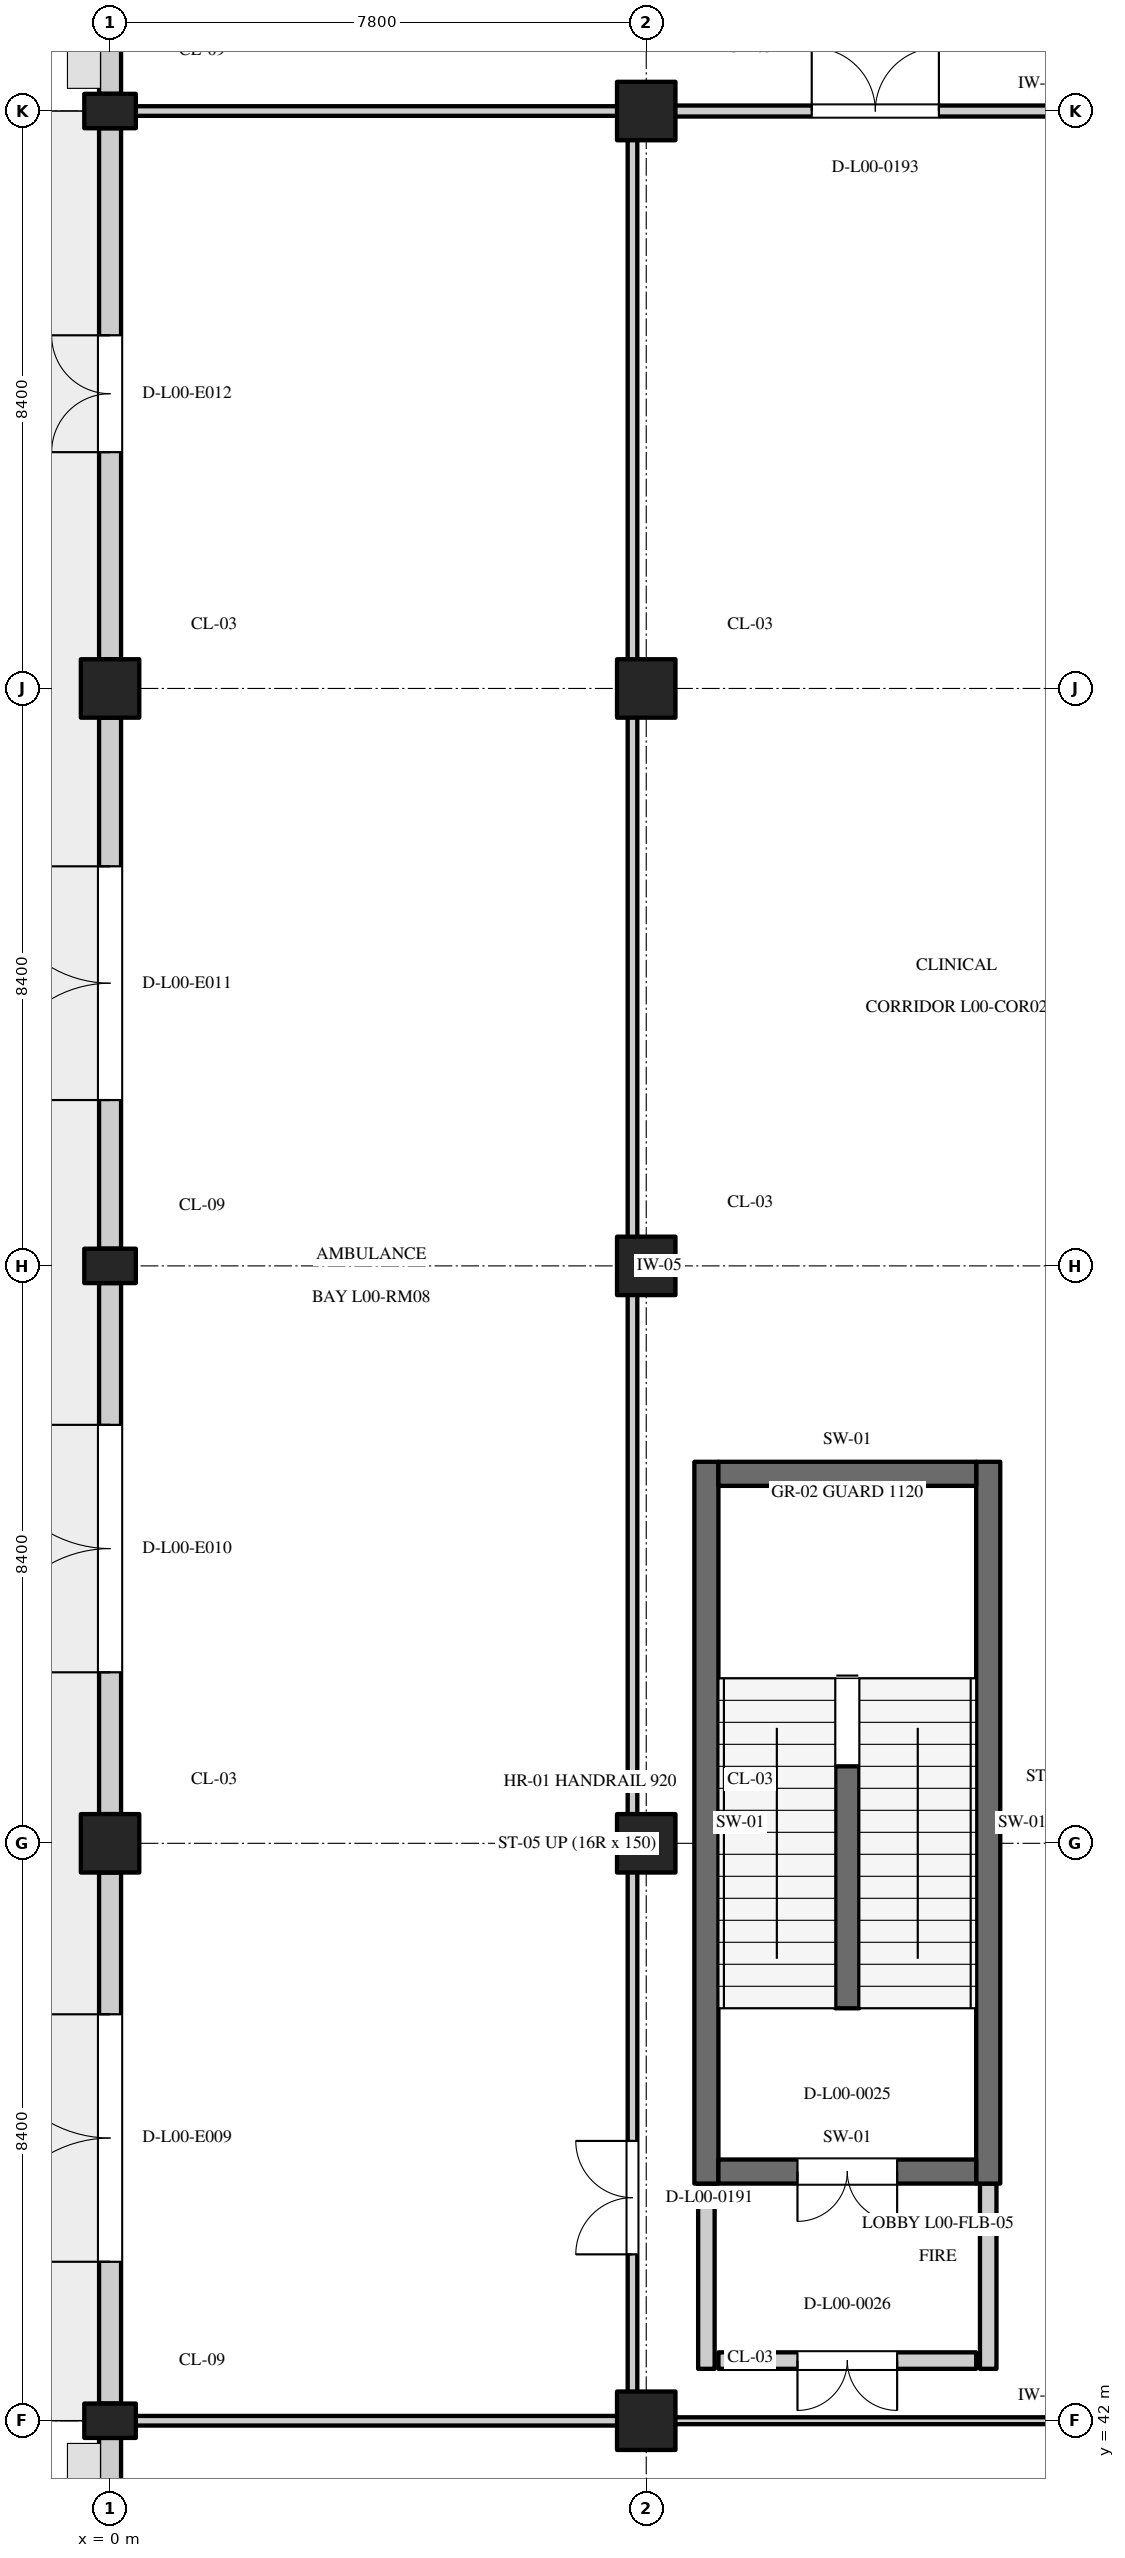
"""IFC4 building model, lengths in metres.
Left out: names, types, materials, properties, quantities, classifications, styles, units other than length and angle.
Written with IfcOpenShell. Run it as: python <this file> out.ifc"""

import sys

from ifc_helpers import new_model, si_unit, direction, frame, frame_2d, origin, origin_2d, place, context, subcontext, project, spatial, rectangle, extrude, element, fill, save


model = new_model("IFC4")
c1 = context("Model", 3, precision=1e-05, world=origin(), true_north=direction((0.0, 1.0)))
c2 = subcontext(c1, "Body", "Model", "MODEL_VIEW")
j1 = project(units=[si_unit("LENGTHUNIT", "METRE"), si_unit("PLANEANGLEUNIT", "RADIAN")], contexts=[c1])
p1 = place(None, origin())
s1 = spatial("IfcSite", under=j1, at=p1, CompositionType="ELEMENT")
p2 = place(p1, origin())
s2 = spatial("IfcBuilding", under=s1, at=p2, CompositionType="ELEMENT")
p3 = place(p2, origin())
s3 = spatial("IfcBuildingStorey", under=s2, at=p3, CompositionType="ELEMENT", Elevation=0.0)
p4 = place(p3, frame((0.0, 42.0, 0.0), z_axis=(0.0, 0.0, 1.0), x_axis=(0.0, 1.0, 0.0)))
e1 = element("IfcColumn", 1, at=p4, inside=s3, PredefinedType="PILASTER", context=c2, shape_type="SweptSolid", body=[
    extrude(rectangle(XDim=0.5, YDim=0.75, at=origin_2d()), origin(), (0.0, 0.0, 1.0), 4.8),
])
p5 = place(p3, frame((0.0, 50.4, 0.0), z_axis=(0.0, 0.0, 1.0), x_axis=(1.0, 0.0, 0.0)))
e2 = element("IfcColumn", 2, at=p5, inside=s3, PredefinedType="COLUMN", context=c2, shape_type="SweptSolid", body=[
    extrude(rectangle(XDim=0.85, YDim=0.85, at=origin_2d()), origin(), (0.0, 0.0, 1.0), 4.8),
])
p6 = place(p3, frame((0.0, 58.8, 0.0), z_axis=(0.0, 0.0, 1.0), x_axis=(0.0, 1.0, 0.0)))
e3 = element("IfcColumn", 3, at=p6, inside=s3, PredefinedType="PILASTER", context=c2, shape_type="SweptSolid", body=[
    extrude(rectangle(XDim=0.5, YDim=0.75, at=origin_2d()), origin(), (0.0, 0.0, 1.0), 4.8),
])
p7 = place(p3, frame((0.0, 67.2, 0.0), z_axis=(0.0, 0.0, 1.0), x_axis=(1.0, 0.0, 0.0)))
e4 = element("IfcColumn", 4, at=p7, inside=s3, PredefinedType="COLUMN", context=c2, shape_type="SweptSolid", body=[
    extrude(rectangle(XDim=0.85, YDim=0.85, at=origin_2d()), origin(), (0.0, 0.0, 1.0), 4.8),
])
p8 = place(p3, frame((0.0, 75.6, 0.0), z_axis=(0.0, 0.0, 1.0), x_axis=(0.0, 1.0, 0.0)))
e5 = element("IfcColumn", 5, at=p8, inside=s3, PredefinedType="PILASTER", context=c2, shape_type="SweptSolid", body=[
    extrude(rectangle(XDim=0.5, YDim=0.75, at=origin_2d()), origin(), (0.0, 0.0, 1.0), 4.8),
])
for number, where, z_axis, x_axis in (
    (6, (7.8, 42.0, 0.0), (0.0, 0.0, 1.0), (1.0, 0.0, 0.0)),
    (7, (7.8, 50.4, 0.0), (0.0, 0.0, 1.0), (1.0, 0.0, 0.0)),
    (8, (7.8, 58.8, 0.0), (0.0, 0.0, 1.0), (1.0, 0.0, 0.0)),
    (9, (7.8, 67.2, 0.0), (0.0, 0.0, 1.0), (1.0, 0.0, 0.0)),
    (10, (7.8, 75.6, 0.0), (0.0, 0.0, 1.0), (1.0, 0.0, 0.0)),
):
    element("IfcColumn", number, at=place(p3, frame(where, z_axis=z_axis, x_axis=x_axis)), inside=s3, PredefinedType="COLUMN", context=c2, shape_type="SweptSolid", body=[
        extrude(rectangle(XDim=0.85, YDim=0.85, at=origin_2d()), origin(), (0.0, 0.0, 1.0), 4.8),
    ])
p9 = place(p3, frame((0.0, 34.025, 0.0), z_axis=(0.0, 0.0, 1.0), x_axis=(0.0, 1.0, 0.0)))
e11 = element("IfcWall", 11, at=p9, inside=s3, PredefinedType="STANDARD", context=c2, shape_type="SweptSolid", body=[
    extrude(rectangle(XDim=7.725, YDim=0.32, at=frame_2d((3.863, 0.0))), origin(), (0.0, 0.0, 1.0), 3.75),
])
p10 = place(p9, frame((0.709, 0.0, 0.75)))
e12 = element("IfcOpeningElement", 12, at=p10, cuts=e11, PredefinedType="OPENING", context=c2, shape_type="SweptSolid", body=[
    extrude(rectangle(XDim=2.1, YDim=1.55, at=frame_2d((1.05, 0.775))), frame((0.0, 0.172, 0.0), z_axis=(0.0, -1.0, 0.0), x_axis=(1.0, 0.0, 0.0)), (0.0, 0.0, 1.0), 0.344),
])
p11 = place(p9, frame((4.741, 0.0, 0.75)))
e13 = element("IfcOpeningElement", 13, at=p11, cuts=e11, PredefinedType="OPENING", context=c2, shape_type="SweptSolid", body=[
    extrude(rectangle(XDim=2.1, YDim=1.55, at=frame_2d((1.05, 0.775))), frame((0.0, 0.172, 0.0), z_axis=(0.0, -1.0, 0.0), x_axis=(1.0, 0.0, 0.0)), (0.0, 0.0, 1.0), 0.344),
])
p12 = place(p3, frame((0.0, 42.25, 0.0), z_axis=(0.0, 0.0, 1.0), x_axis=(0.0, 1.0, 0.0)))
e14 = element("IfcWall", 14, at=p12, inside=s3, PredefinedType="STANDARD", context=c2, shape_type="SweptSolid", body=[
    extrude(rectangle(XDim=7.725, YDim=0.32, at=frame_2d((3.863, 0.0))), origin(), (0.0, 0.0, 1.0), 3.75),
])
p13 = place(p12, frame((2.062, 0.0, 0.0)))
e15 = element("IfcOpeningElement", 15, at=p13, cuts=e14, PredefinedType="OPENING", context=c2, shape_type="SweptSolid", body=[
    extrude(rectangle(XDim=3.6, YDim=3.4, at=frame_2d((1.8, 1.7))), frame((0.0, 0.172, 0.0), z_axis=(0.0, -1.0, 0.0), x_axis=(1.0, 0.0, 0.0)), (0.0, 0.0, 1.0), 0.344),
])
p14 = place(p3, frame((0.0, 50.825, 0.0), z_axis=(0.0, 0.0, 1.0), x_axis=(0.0, 1.0, 0.0)))
e16 = element("IfcWall", 16, at=p14, inside=s3, PredefinedType="STANDARD", context=c2, shape_type="SweptSolid", body=[
    extrude(rectangle(XDim=7.725, YDim=0.32, at=frame_2d((3.863, 0.0))), origin(), (0.0, 0.0, 1.0), 3.75),
])
p15 = place(p14, frame((2.062, 0.0, 0.0)))
e17 = element("IfcOpeningElement", 17, at=p15, cuts=e16, PredefinedType="OPENING", context=c2, shape_type="SweptSolid", body=[
    extrude(rectangle(XDim=3.6, YDim=3.4, at=frame_2d((1.8, 1.7))), frame((0.0, 0.172, 0.0), z_axis=(0.0, -1.0, 0.0), x_axis=(1.0, 0.0, 0.0)), (0.0, 0.0, 1.0), 0.344),
])
p16 = place(p3, frame((0.0, 59.05, 0.0), z_axis=(0.0, 0.0, 1.0), x_axis=(0.0, 1.0, 0.0)))
e18 = element("IfcWall", 18, at=p16, inside=s3, PredefinedType="STANDARD", context=c2, shape_type="SweptSolid", body=[
    extrude(rectangle(XDim=7.725, YDim=0.32, at=frame_2d((3.862, 0.0))), origin(), (0.0, 0.0, 1.0), 3.75),
])
p17 = place(p16, frame((2.163, 0.0, 0.0)))
e19 = element("IfcOpeningElement", 19, at=p17, cuts=e18, PredefinedType="OPENING", context=c2, shape_type="SweptSolid", body=[
    extrude(rectangle(XDim=3.4, YDim=3.3, at=frame_2d((1.7, 1.65))), frame((0.0, 0.172, 0.0), z_axis=(0.0, -1.0, 0.0), x_axis=(1.0, 0.0, 0.0)), (0.0, 0.0, 1.0), 0.344),
])
p18 = place(p3, frame((0.0, 67.625, 0.0), z_axis=(0.0, 0.0, 1.0), x_axis=(0.0, 1.0, 0.0)))
e20 = element("IfcWall", 20, at=p18, inside=s3, PredefinedType="STANDARD", context=c2, shape_type="SweptSolid", body=[
    extrude(rectangle(XDim=7.725, YDim=0.32, at=frame_2d((3.863, 0.0))), origin(), (0.0, 0.0, 1.0), 3.75),
])
p19 = place(p18, frame((3.012, 0.0, 0.0)))
e21 = element("IfcOpeningElement", 21, at=p19, cuts=e20, PredefinedType="OPENING", context=c2, shape_type="SweptSolid", body=[
    extrude(rectangle(XDim=1.7, YDim=2.2, at=frame_2d((0.85, 1.1))), frame((0.0, 0.172, 0.0), z_axis=(0.0, -1.0, 0.0), x_axis=(1.0, 0.0, 0.0)), (0.0, 0.0, 1.0), 0.344),
])
p20 = place(p3, frame((0.0, 75.85, 0.0), z_axis=(0.0, 0.0, 1.0), x_axis=(0.0, 1.0, 0.0)))
e22 = element("IfcWall", 22, at=p20, inside=s3, PredefinedType="STANDARD", context=c2, shape_type="SweptSolid", body=[
    extrude(rectangle(XDim=7.725, YDim=0.32, at=frame_2d((3.862, 0.0))), origin(), (0.0, 0.0, 1.0), 3.75),
])
p21 = place(p20, frame((0.934, 0.0, 0.75)))
e23 = element("IfcOpeningElement", 23, at=p21, cuts=e22, PredefinedType="OPENING", context=c2, shape_type="SweptSolid", body=[
    extrude(rectangle(XDim=2.0, YDim=1.45, at=frame_2d((1.0, 0.725))), frame((0.0, 0.172, 0.0), z_axis=(0.0, -1.0, 0.0), x_axis=(1.0, 0.0, 0.0)), (0.0, 0.0, 1.0), 0.344),
])
p22 = place(p20, frame((4.966, 0.0, 0.75)))
e24 = element("IfcOpeningElement", 24, at=p22, cuts=e22, PredefinedType="OPENING", context=c2, shape_type="SweptSolid", body=[
    extrude(rectangle(XDim=2.0, YDim=1.45, at=frame_2d((1.0, 0.725))), frame((0.0, 0.172, 0.0), z_axis=(0.0, -1.0, 0.0), x_axis=(1.0, 0.0, 0.0)), (0.0, 0.0, 1.0), 0.344),
])
for number, where, z_axis, x_axis in (
    (25, (8.675, 45.45, 0.0), (0.0, 0.0, 1.0), (0.0, 1.0, 0.0)),
    (26, (12.775, 45.45, 0.0), (0.0, 0.0, 1.0), (0.0, 1.0, 0.0)),
):
    element("IfcWall", number, at=place(p3, frame(where, z_axis=z_axis, x_axis=x_axis)), inside=s3, PredefinedType="SHEAR", context=c2, shape_type="SweptSolid", body=[
        extrude(rectangle(XDim=10.5, YDim=0.35, at=frame_2d((5.25, 0.0))), origin(), (0.0, 0.0, 1.0), 4.8),
    ])
p23 = place(p3, frame((8.85, 55.775, 0.0), z_axis=(0.0, 0.0, 1.0), x_axis=(1.0, 0.0, 0.0)))
e27 = element("IfcWall", 27, at=p23, inside=s3, PredefinedType="SHEAR", context=c2, shape_type="SweptSolid", body=[
    extrude(rectangle(XDim=3.75, YDim=0.35, at=frame_2d((1.875, 0.0))), origin(), (0.0, 0.0, 1.0), 4.8),
])
p24 = place(p3, frame((8.85, 45.625, 0.0), z_axis=(0.0, 0.0, 1.0), x_axis=(1.0, 0.0, 0.0)))
e28 = element("IfcWall", 28, at=p24, inside=s3, PredefinedType="SHEAR", context=c2, shape_type="SweptSolid", body=[
    extrude(rectangle(XDim=3.75, YDim=0.35, at=frame_2d((1.875, 0.0))), origin(), (0.0, 0.0, 1.0), 4.45),
])
p25 = place(p24, frame((1.15, 0.0, 0.0)))
e29 = element("IfcOpeningElement", 29, at=p25, cuts=e28, PredefinedType="OPENING", context=c2, shape_type="SweptSolid", body=[
    extrude(rectangle(XDim=1.45, YDim=2.2, at=frame_2d((0.725, 1.1))), frame((0.0, 0.187, 0.0), z_axis=(0.0, -1.0, 0.0), x_axis=(1.0, 0.0, 0.0)), (0.0, 0.0, 1.0), 0.374),
])
for number, where, z_axis, x_axis in (
    (30, (8.675, 42.755, 0.0), (0.0, 0.0, 1.0), (0.0, 1.0, 0.0)),
    (31, (12.775, 42.755, 0.0), (0.0, 0.0, 1.0), (0.0, 1.0, 0.0)),
):
    element("IfcWall", number, at=place(p3, frame(where, z_axis=z_axis, x_axis=x_axis)), inside=s3, PredefinedType="STANDARD", context=c2, shape_type="SweptSolid", body=[
        extrude(rectangle(XDim=2.695, YDim=0.24, at=frame_2d((1.348, 0.0))), origin(), (0.0, 0.0, 1.0), 4.45),
    ])
p26 = place(p3, frame((8.85, 42.875, 0.0), z_axis=(0.0, 0.0, 1.0), x_axis=(1.0, 0.0, 0.0)))
e32 = element("IfcWall", 32, at=p26, inside=s3, PredefinedType="STANDARD", context=c2, shape_type="SweptSolid", body=[
    extrude(rectangle(XDim=3.75, YDim=0.24, at=frame_2d((1.875, 0.0))), origin(), (0.0, 0.0, 1.0), 4.45),
])
p27 = place(p26, frame((1.15, 0.0, 0.0)))
e33 = element("IfcOpeningElement", 33, at=p27, cuts=e32, PredefinedType="OPENING", context=c2, shape_type="SweptSolid", body=[
    extrude(rectangle(XDim=1.45, YDim=2.2, at=frame_2d((0.725, 1.1))), frame((0.0, 0.132, 0.0), z_axis=(0.0, -1.0, 0.0), x_axis=(1.0, 0.0, 0.0)), (0.0, 0.0, 1.0), 0.264),
])
p28 = place(p3, frame((10.725, 48.0, 0.0), z_axis=(0.0, 0.0, 1.0), x_axis=(0.0, 1.0, 0.0)))
e34 = element("IfcWall", 34, at=p28, inside=s3, PredefinedType="SHEAR", context=c2, shape_type="SweptSolid", body=[
    extrude(rectangle(XDim=3.52, YDim=0.35, at=frame_2d((1.76, 0.0))), origin(), (0.0, 0.0, 1.0), 4.8),
])
p29 = place(p3, frame((7.6, 42.085, 0.0), z_axis=(0.0, 0.0, 1.0), x_axis=(0.0, 1.0, 0.0)))
e35 = element("IfcWall", 35, at=p29, inside=s3, PredefinedType="PARTITIONING", context=c2, shape_type="SweptSolid", body=[
    extrude(rectangle(XDim=33.43, YDim=0.14, at=frame_2d((16.715, 0.0))), origin(), (0.0, 0.0, 1.0), 4.43),
])
p30 = place(p29, frame((2.335, 0.0, 0.0)))
e36 = element("IfcOpeningElement", 36, at=p30, cuts=e35, PredefinedType="OPENING", context=c2, shape_type="SweptSolid", body=[
    extrude(rectangle(XDim=1.65, YDim=2.25, at=frame_2d((0.825, 1.125))), frame((0.0, 0.082, 0.0), z_axis=(0.0, -1.0, 0.0), x_axis=(1.0, 0.0, 0.0)), (0.0, 0.0, 1.0), 0.164),
])
p31 = place(p3, frame((0.085, 42.0, 0.0), z_axis=(0.0, 0.0, 1.0), x_axis=(1.0, 0.0, 0.0)))
e37 = element("IfcWall", 37, at=p31, inside=s3, PredefinedType="PARTITIONING", context=c2, shape_type="SweptSolid", body=[
    extrude(rectangle(XDim=7.43, YDim=0.14, at=frame_2d((3.715, 0.0))), origin(), (0.0, 0.0, 1.0), 4.43),
])
p32 = place(p3, frame((0.085, 75.6, 0.0), z_axis=(0.0, 0.0, 1.0), x_axis=(1.0, 0.0, 0.0)))
e38 = element("IfcWall", 38, at=p32, inside=s3, PredefinedType="PARTITIONING", context=c2, shape_type="SweptSolid", body=[
    extrude(rectangle(XDim=7.43, YDim=0.14, at=frame_2d((3.715, 0.0))), origin(), (0.0, 0.0, 1.0), 3.7),
])
p33 = place(p3, frame((0.0, 50.015, 0.0), z_axis=(0.0, 0.0, 1.0), x_axis=(0.0, 1.0, 0.0)))
e39 = element("IfcWall", 39, at=p33, inside=s3, PredefinedType="PARTITIONING", context=c2, shape_type="SweptSolid", body=[
    extrude(rectangle(XDim=0.77, YDim=0.14, at=frame_2d((0.385, 0.0))), origin(), (0.0, 0.0, 1.0), 3.7),
])
p34 = place(p3, frame((0.0, 58.59, 0.0), z_axis=(0.0, 0.0, 1.0), x_axis=(0.0, 1.0, 0.0)))
e40 = element("IfcWall", 40, at=p34, inside=s3, PredefinedType="PARTITIONING", context=c2, shape_type="SweptSolid", body=[
    extrude(rectangle(XDim=0.42, YDim=0.14, at=frame_2d((0.21, 0.0))), origin(), (0.0, 0.0, 1.0), 3.7),
])
p35 = place(p3, frame((0.0, 66.815, 0.0), z_axis=(0.0, 0.0, 1.0), x_axis=(0.0, 1.0, 0.0)))
e41 = element("IfcWall", 41, at=p35, inside=s3, PredefinedType="PARTITIONING", context=c2, shape_type="SweptSolid", body=[
    extrude(rectangle(XDim=0.77, YDim=0.14, at=frame_2d((0.385, 0.0))), origin(), (0.0, 0.0, 1.0), 3.7),
])
p36 = place(p3, frame((7.555, 42.0, 0.0), z_axis=(0.0, 0.0, 1.0), x_axis=(1.0, 0.0, 0.0)))
e42 = element("IfcWall", 42, at=p36, inside=s3, PredefinedType="PARTITIONING", context=c2, shape_type="SweptSolid", body=[
    extrude(rectangle(XDim=11.96, YDim=0.1, at=frame_2d((5.98, 0.0))), origin(), (0.0, 0.0, 1.0), 4.43),
])
p37 = place(p36, frame((10.31, 0.0, 0.0)))
e43 = element("IfcOpeningElement", 43, at=p37, cuts=e42, PredefinedType="OPENING", context=c2, shape_type="SweptSolid", body=[
    extrude(rectangle(XDim=1.4, YDim=2.25, at=frame_2d((0.7, 1.125))), frame((0.0, 0.062, 0.0), z_axis=(0.0, -1.0, 0.0), x_axis=(1.0, 0.0, 0.0)), (0.0, 0.0, 1.0), 0.124),
])
p38 = place(p3, frame((7.555, 75.6, 0.0), z_axis=(0.0, 0.0, 1.0), x_axis=(1.0, 0.0, 0.0)))
e44 = element("IfcWall", 44, at=p38, inside=s3, PredefinedType="PARTITIONING", context=c2, shape_type="SweptSolid", body=[
    extrude(rectangle(XDim=11.96, YDim=0.16, at=frame_2d((5.98, 0.0))), origin(), (0.0, 0.0, 1.0), 3.7),
])
p39 = place(p38, frame((2.653, 0.0, 0.0)))
e45 = element("IfcOpeningElement", 45, at=p39, cuts=e44, PredefinedType="OPENING", context=c2, shape_type="SweptSolid", body=[
    extrude(rectangle(XDim=1.85, YDim=2.3, at=frame_2d((0.925, 1.15))), frame((0.0, 0.092, 0.0), z_axis=(0.0, -1.0, 0.0), x_axis=(1.0, 0.0, 0.0)), (0.0, 0.0, 1.0), 0.184),
])
p40 = place(p13, origin())
e46 = element("IfcDoor", 46, at=p40, inside=s3, OperationType="DOUBLE_DOOR_SINGLE_SWING", PredefinedType="GATE", context=c2, shape_type="SweptSolid", body=[
    extrude(rectangle(XDim=3.6, YDim=3.4, at=frame_2d((1.8, 1.7))), frame((0.0, 0.025, 0.0), z_axis=(0.0, -1.0, 0.0), x_axis=(1.0, 0.0, 0.0)), (0.0, 0.0, 1.0), 0.05),
])
fill(e15, e46)
p41 = place(p15, origin())
e47 = element("IfcDoor", 47, at=p41, inside=s3, OperationType="DOUBLE_DOOR_SINGLE_SWING", PredefinedType="GATE", context=c2, shape_type="SweptSolid", body=[
    extrude(rectangle(XDim=3.6, YDim=3.4, at=frame_2d((1.8, 1.7))), frame((0.0, 0.025, 0.0), z_axis=(0.0, -1.0, 0.0), x_axis=(1.0, 0.0, 0.0)), (0.0, 0.0, 1.0), 0.05),
])
fill(e17, e47)
p42 = place(p17, origin())
e48 = element("IfcDoor", 48, at=p42, inside=s3, OperationType="DOUBLE_DOOR_SINGLE_SWING", PredefinedType="GATE", context=c2, shape_type="SweptSolid", body=[
    extrude(rectangle(XDim=3.4, YDim=3.3, at=frame_2d((1.7, 1.65))), frame((0.0, 0.025, 0.0), z_axis=(0.0, -1.0, 0.0), x_axis=(1.0, 0.0, 0.0)), (0.0, 0.0, 1.0), 0.05),
])
fill(e19, e48)
p43 = place(p19, origin())
e49 = element("IfcDoor", 49, at=p43, inside=s3, OperationType="DOUBLE_DOOR_SINGLE_SWING", PredefinedType="DOOR", context=c2, shape_type="SweptSolid", body=[
    extrude(rectangle(XDim=1.7, YDim=2.2, at=frame_2d((0.85, 1.1))), frame((0.0, 0.025, 0.0), z_axis=(0.0, -1.0, 0.0), x_axis=(1.0, 0.0, 0.0)), (0.0, 0.0, 1.0), 0.05),
])
fill(e21, e49)
p44 = place(p25, frame((1.45, 0.0, 0.0), z_axis=(0.0, 0.0, 1.0), x_axis=(-1.0, 0.0, 0.0)))
e50 = element("IfcDoor", 50, at=p44, inside=s3, OperationType="DOUBLE_DOOR_SINGLE_SWING", PredefinedType="DOOR", context=c2, shape_type="SweptSolid", body=[
    extrude(rectangle(XDim=1.45, YDim=2.2, at=frame_2d((0.725, 1.1))), frame((0.0, 0.025, 0.0), z_axis=(0.0, -1.0, 0.0), x_axis=(1.0, 0.0, 0.0)), (0.0, 0.0, 1.0), 0.05),
])
fill(e29, e50)
p45 = place(p27, frame((1.45, 0.0, 0.0), z_axis=(0.0, 0.0, 1.0), x_axis=(-1.0, 0.0, 0.0)))
e51 = element("IfcDoor", 51, at=p45, inside=s3, OperationType="DOUBLE_DOOR_SINGLE_SWING", PredefinedType="DOOR", context=c2, shape_type="SweptSolid", body=[
    extrude(rectangle(XDim=1.45, YDim=2.2, at=frame_2d((0.725, 1.1))), frame((0.0, 0.025, 0.0), z_axis=(0.0, -1.0, 0.0), x_axis=(1.0, 0.0, 0.0)), (0.0, 0.0, 1.0), 0.05),
])
fill(e33, e51)
p46 = place(p30, origin())
e52 = element("IfcDoor", 52, at=p46, inside=s3, OperationType="DOUBLE_DOOR_SINGLE_SWING", PredefinedType="DOOR", context=c2, shape_type="SweptSolid", body=[
    extrude(rectangle(XDim=1.65, YDim=2.25, at=frame_2d((0.825, 1.125))), frame((0.0, 0.025, 0.0), z_axis=(0.0, -1.0, 0.0), x_axis=(1.0, 0.0, 0.0)), (0.0, 0.0, 1.0), 0.05),
])
fill(e36, e52)
p47 = place(p39, origin())
e53 = element("IfcDoor", 53, at=p47, inside=s3, OperationType="DOUBLE_DOOR_SINGLE_SWING", PredefinedType="DOOR", context=c2, shape_type="SweptSolid", body=[
    extrude(rectangle(XDim=1.85, YDim=2.3, at=frame_2d((0.925, 1.15))), frame((0.0, 0.025, 0.0), z_axis=(0.0, -1.0, 0.0), x_axis=(1.0, 0.0, 0.0)), (0.0, 0.0, 1.0), 0.05),
])
fill(e45, e53)
save(model, sys.argv[1])
